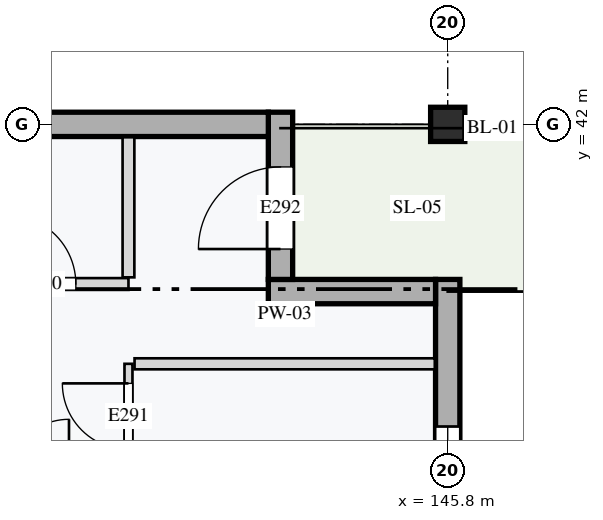
"""IFC4 building model, lengths in metres.
Left out: names, types, materials, properties, quantities, classifications, styles, units other than length and angle.
Written with IfcOpenShell. Run it as: python <this file> out.ifc"""

import sys

from ifc_helpers import new_model, si_unit, direction, frame, frame_2d, origin, origin_2d, place, context, subcontext, project, spatial, rectangle, extrude, element, fill, save


model = new_model("IFC4")
c1 = context("Model", 3, precision=1e-05, world=origin(), true_north=direction((0.0, 1.0)))
c2 = subcontext(c1, "Body", "Model", "MODEL_VIEW")
j1 = project(units=[si_unit("LENGTHUNIT", "METRE"), si_unit("PLANEANGLEUNIT", "RADIAN")], contexts=[c1])
p1 = place(None, origin())
s1 = spatial("IfcSite", under=j1, at=p1, CompositionType="ELEMENT")
p2 = place(p1, origin())
s2 = spatial("IfcBuilding", under=s1, at=p2, CompositionType="ELEMENT")
p3 = place(p2, frame((0.0, 0.0, 21.2)))
s3 = spatial("IfcBuildingStorey", under=s2, at=p3, CompositionType="ELEMENT", Elevation=21.2)
p4 = place(p3, frame((145.8, 42.0, 0.0), z_axis=(0.0, 0.0, 1.0), x_axis=(1.0, 0.0, 0.0)))
e1 = element("IfcColumn", 1, at=p4, inside=s3, PredefinedType="COLUMN", context=c2, shape_type="SweptSolid", body=[
    extrude(rectangle(XDim=0.45, YDim=0.45, at=origin_2d()), origin(), (0.0, 0.0, 1.0), 3.2),
])
p5 = place(p3, frame((145.8, 35.625, 0.0), z_axis=(0.0, 0.0, 1.0), x_axis=(0.0, 1.0, 0.0)))
e2 = element("IfcWall", 2, at=p5, inside=s3, PredefinedType="STANDARD", context=c2, shape_type="SweptSolid", body=[
    extrude(rectangle(XDim=4.335, YDim=0.32, at=frame_2d((2.167, 0.0))), origin(), (0.0, 0.0, 1.0), 2.6),
])
p6 = place(p5, frame((0.6, 0.0, 0.85)))
e3 = element("IfcOpeningElement", 3, at=p6, cuts=e2, PredefinedType="OPENING", context=c2, shape_type="SweptSolid", body=[
    extrude(rectangle(XDim=1.8, YDim=1.35, at=frame_2d((0.9, 0.675))), frame((0.0, 0.17, 0.0), z_axis=(0.0, -1.0, 0.0), x_axis=(1.0, 0.0, 0.0)), (0.0, 0.0, 1.0), 0.34),
])
p7 = place(p3, frame((145.64, 39.8, 0.0), z_axis=(0.0, 0.0, 1.0), x_axis=(-1.0, 0.0, 0.0)))
e4 = element("IfcWall", 4, at=p7, inside=s3, PredefinedType="STANDARD", context=c2, shape_type="SweptSolid", body=[
    extrude(rectangle(XDim=2.2, YDim=0.32, at=frame_2d((1.1, 0.0))), origin(), (0.0, 0.0, 1.0), 2.96),
])
p8 = place(p3, frame((143.6, 39.96, 0.0), z_axis=(0.0, 0.0, 1.0), x_axis=(0.0, 1.0, 0.0)))
e5 = element("IfcWall", 5, at=p8, inside=s3, PredefinedType="STANDARD", context=c2, shape_type="SweptSolid", body=[
    extrude(rectangle(XDim=2.2, YDim=0.32, at=frame_2d((1.1, 0.0))), origin(), (0.0, 0.0, 1.0), 2.96),
])
p9 = place(p8, frame((0.4, 0.0, 0.0)))
e6 = element("IfcOpeningElement", 6, at=p9, cuts=e5, PredefinedType="OPENING", context=c2, shape_type="SweptSolid", body=[
    extrude(rectangle(XDim=1.08, YDim=2.22, at=frame_2d((0.54, 1.11))), frame((0.0, 0.17, 0.0), z_axis=(0.0, -1.0, 0.0), x_axis=(1.0, 0.0, 0.0)), (0.0, 0.0, 1.0), 0.34),
])
p10 = place(p3, frame((139.425, 42.0, 0.0), z_axis=(0.0, 0.0, 1.0), x_axis=(1.0, 0.0, 0.0)))
e7 = element("IfcWall", 7, at=p10, inside=s3, PredefinedType="STANDARD", context=c2, shape_type="SweptSolid", body=[
    extrude(rectangle(XDim=4.015, YDim=0.32, at=frame_2d((2.007, 0.0))), origin(), (0.0, 0.0, 1.0), 2.65),
])
p11 = place(p3, frame((139.298, 39.9, 0.0), z_axis=(0.0, 0.0, 1.0), x_axis=(1.0, 0.0, 0.0)))
e8 = element("IfcWall", 8, at=p11, inside=s3, PredefinedType="PARTITIONING", context=c2, shape_type="SweptSolid", body=[
    extrude(rectangle(XDim=2.302, YDim=0.155, at=frame_2d((1.151, 0.0))), origin(), (0.0, 0.0, 1.0), 2.96),
])
p12 = place(p11, frame((0.7, 0.0, 0.0)))
e9 = element("IfcOpeningElement", 9, at=p12, cuts=e8, PredefinedType="OPENING", context=c2, shape_type="SweptSolid", body=[
    extrude(rectangle(XDim=0.91, YDim=2.14, at=frame_2d((0.455, 1.07))), frame((0.0, 0.087, 0.0), z_axis=(0.0, -1.0, 0.0), x_axis=(1.0, 0.0, 0.0)), (0.0, 0.0, 1.0), 0.175),
])
p13 = place(p3, frame((141.6, 39.988, 0.0), z_axis=(0.0, 0.0, 1.0), x_axis=(0.0, 1.0, 0.0)))
e10 = element("IfcWall", 10, at=p13, inside=s3, PredefinedType="PARTITIONING", context=c2, shape_type="SweptSolid", body=[
    extrude(rectangle(XDim=1.843, YDim=0.155, at=frame_2d((0.921, 0.0))), origin(), (0.0, 0.0, 1.0), 2.96),
])
p14 = place(p3, frame((141.6, 37.373, 0.0), z_axis=(0.0, 0.0, 1.0), x_axis=(0.0, 1.0, 0.0)))
e11 = element("IfcWall", 11, at=p14, inside=s3, PredefinedType="PARTITIONING", context=c2, shape_type="SweptSolid", body=[
    extrude(rectangle(XDim=1.478, YDim=0.105, at=frame_2d((0.739, 0.0))), origin(), (0.0, 0.0, 1.0), 2.96),
])
p15 = place(p14, frame((0.35, 0.0, 0.0)))
e12 = element("IfcOpeningElement", 12, at=p15, cuts=e11, PredefinedType="OPENING", context=c2, shape_type="SweptSolid", body=[
    extrude(rectangle(XDim=0.87, YDim=2.08, at=frame_2d((0.435, 1.04))), frame((0.0, 0.062, 0.0), z_axis=(0.0, -1.0, 0.0), x_axis=(1.0, 0.0, 0.0)), (0.0, 0.0, 1.0), 0.125),
])
p16 = place(p3, frame((141.68, 38.85, 0.0), z_axis=(0.0, 0.0, 1.0), x_axis=(1.0, 0.0, 0.0)))
e13 = element("IfcWall", 13, at=p16, inside=s3, PredefinedType="PARTITIONING", context=c2, shape_type="SweptSolid", body=[
    extrude(rectangle(XDim=3.95, YDim=0.145, at=frame_2d((1.975, 0.0))), origin(), (0.0, 0.0, 1.0), 2.96),
])
p17 = place(p6, origin())
e14 = element("IfcWindow", 14, at=p17, inside=s3, PartitioningType="SINGLE_PANEL", PredefinedType="WINDOW", context=c2, shape_type="SweptSolid", body=[
    extrude(rectangle(XDim=1.8, YDim=1.35, at=frame_2d((0.9, 0.675))), frame((0.0, 0.03, 0.0), z_axis=(0.0, -1.0, 0.0), x_axis=(1.0, 0.0, 0.0)), (0.0, 0.0, 1.0), 0.06),
])
fill(e3, e14)
p18 = place(p9, origin())
e15 = element("IfcDoor", 15, at=p18, inside=s3, OperationType="SINGLE_SWING_LEFT", PredefinedType="DOOR", context=c2, shape_type="SweptSolid", body=[
    extrude(rectangle(XDim=1.08, YDim=2.22, at=frame_2d((0.54, 1.11))), frame((0.0, 0.025, 0.0), z_axis=(0.0, -1.0, 0.0), x_axis=(1.0, 0.0, 0.0)), (0.0, 0.0, 1.0), 0.05),
])
fill(e6, e15)
p19 = place(p12, origin())
e16 = element("IfcDoor", 16, at=p19, inside=s3, OperationType="SINGLE_SWING_LEFT", PredefinedType="DOOR", context=c2, shape_type="SweptSolid", body=[
    extrude(rectangle(XDim=0.91, YDim=2.14, at=frame_2d((0.455, 1.07))), frame((0.0, 0.025, 0.0), z_axis=(0.0, -1.0, 0.0), x_axis=(1.0, 0.0, 0.0)), (0.0, 0.0, 1.0), 0.05),
])
fill(e9, e16)
p20 = place(p15, origin())
e17 = element("IfcDoor", 17, at=p20, inside=s3, OperationType="SINGLE_SWING_RIGHT", PredefinedType="DOOR", context=c2, shape_type="SweptSolid", body=[
    extrude(rectangle(XDim=0.87, YDim=2.08, at=frame_2d((0.435, 1.04))), frame((0.0, 0.025, 0.0), z_axis=(0.0, -1.0, 0.0), x_axis=(1.0, 0.0, 0.0)), (0.0, 0.0, 1.0), 0.05),
])
fill(e12, e17)
save(model, sys.argv[1])
